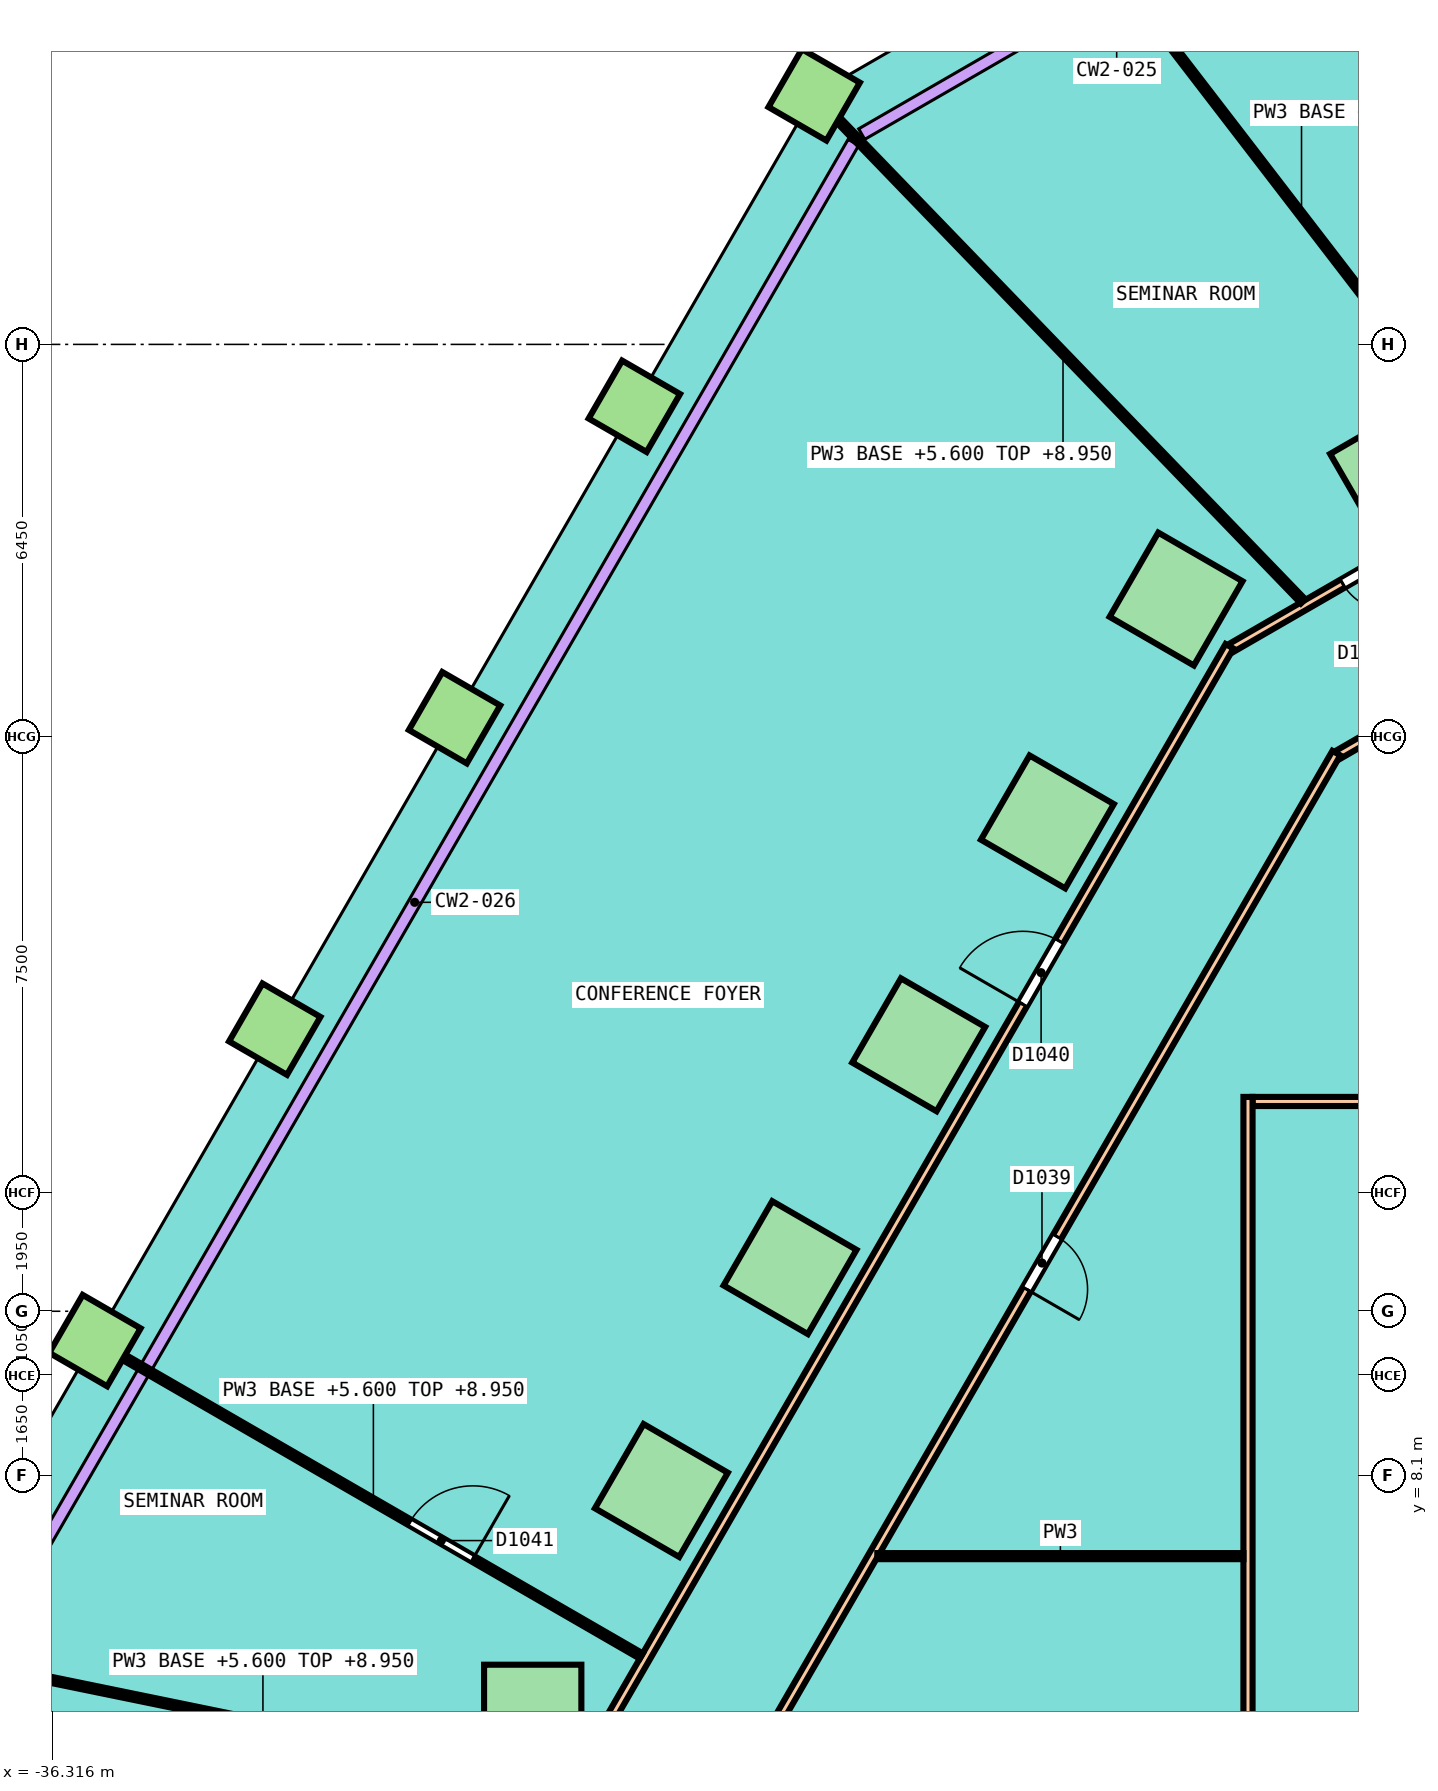
"""IFC4 building model, lengths in metres.
Left out: names, types, materials, properties, quantities, classifications, styles, units other than length and angle.
Written with IfcOpenShell. Run it as: python <this file> out.ifc"""

import sys

from ifc_helpers import new_model, si_unit, direction, frame, frame_2d, origin, origin_2d, place, context, subcontext, project, spatial, rectangle, extrude, element, fill, save


model = new_model("IFC4")
c1 = context("Model", 3, precision=1e-05, world=origin(), true_north=direction((0.0, 1.0)))
c2 = subcontext(c1, "Body", "Model", "MODEL_VIEW")
j1 = project(units=[si_unit("LENGTHUNIT", "METRE"), si_unit("PLANEANGLEUNIT", "RADIAN")], contexts=[c1])
p1 = place(None, origin())
s1 = spatial("IfcSite", under=j1, at=p1, CompositionType="ELEMENT")
p2 = place(p1, origin())
s2 = spatial("IfcBuilding", under=s1, at=p2, CompositionType="ELEMENT")
p3 = place(p2, frame((0.0, 0.0, 5.6)))
s3 = spatial("IfcBuildingStorey", under=s2, at=p3, CompositionType="ELEMENT", Elevation=5.6)
for number, where, z_axis, x_axis in (
    (1, (-14.206, 24.606, 0.0), (0.0, 0.0, 1.0), (-0.866, -0.5, 0.0)),
    (2, (-17.833, 22.512, 0.0), (0.0, 0.0, 1.0), (-0.5, -0.866, 0.0)),
    (3, (-19.949, 18.847, 0.0), (0.0, 0.0, 1.0), (-0.5, -0.866, 0.0)),
    (4, (-22.065, 15.183, 0.0), (0.0, 0.0, 1.0), (-0.5, -0.866, 0.0)),
    (5, (-24.181, 11.518, 0.0), (0.0, 0.0, 1.0), (-0.5, -0.866, 0.0)),
    (6, (-26.297, 7.853, 0.0), (0.0, 0.0, 1.0), (-0.5, -0.866, 0.0)),
    (7, (-28.413, 4.188, 0.0), (0.0, 0.0, 1.0), (0.0, -1.0, 0.0)),
):
    element("IfcColumn", number, at=place(p3, frame(where, z_axis=z_axis, x_axis=x_axis)), inside=s3, PredefinedType="COLUMN", context=c2, shape_type="SweptSolid", body=[
        extrude(rectangle(XDim=1.6, YDim=1.6, at=origin_2d()), origin(), (0.0, 0.0, 1.0), 4.25),
    ])
for number, where, z_axis, x_axis in (
    (8, (-23.785, 30.804, 0.0), (0.0, 0.0, 1.0), (-0.5, -0.866, 0.0)),
    (9, (-26.741, 25.682, 0.0), (0.0, 0.0, 1.0), (-0.5, -0.866, 0.0)),
    (10, (-29.698, 20.561, 0.0), (0.0, 0.0, 1.0), (-0.5, -0.866, 0.0)),
    (11, (-32.656, 15.439, 0.0), (0.0, 0.0, 1.0), (-0.5, -0.866, 0.0)),
    (12, (-35.612, 10.318, 0.0), (0.0, 0.0, 1.0), (-0.5, -0.866, 0.0)),
):
    element("IfcColumn", number, at=place(p3, frame(where, z_axis=z_axis, x_axis=x_axis)), inside=s3, PredefinedType="COLUMN", context=c2, shape_type="SweptSolid", body=[
        extrude(rectangle(XDim=1.1, YDim=1.1, at=origin_2d()), origin(), (0.0, 0.0, 1.0), 4.25),
    ])
p4 = place(p3, frame((-16.926, 21.708, 0.0), z_axis=(0.0, 0.0, 1.0), x_axis=(0.866023143435, 0.50000391502, 0.0)))
e13 = element("IfcWall", 13, at=p4, inside=s3, PredefinedType="PARTITIONING", context=c2, shape_type="SweptSolid", body=[
    extrude(rectangle(XDim=7.759, YDim=0.15, at=frame_2d((3.879, 0.0))), origin(), (0.0, 0.0, 1.0), 3.2),
])
p5 = place(p4, frame((2.117, 0.0, 0.0)))
e14 = element("IfcOpeningElement", 14, at=p5, cuts=e13, PredefinedType="OPENING", context=c2, shape_type="SweptSolid", body=[
    extrude(rectangle(XDim=0.9, YDim=2.1, at=frame_2d((0.45, 1.05))), frame((0.0, 0.085, 0.0), z_axis=(0.0, -1.0, 0.0), x_axis=(1.0, 0.0, 0.0)), (0.0, 0.0, 1.0), 0.17),
])
p6 = place(p3, frame((-15.169, 19.951, 0.0), z_axis=(0.0, 0.0, 1.0), x_axis=(0.866024786089, 0.500001069878, 0.0)))
e15 = element("IfcWall", 15, at=p6, inside=s3, PredefinedType="PARTITIONING", context=c2, shape_type="SweptSolid", body=[
    extrude(rectangle(XDim=6.473, YDim=0.15, at=frame_2d((3.236, 0.0))), origin(), (0.0, 0.0, 1.0), 3.2),
])
p7 = place(p3, frame((-24.825, 3.301, 0.0), z_axis=(0.0, 0.0, 1.0), x_axis=(0.499992422807, 0.866029778435, 0.0)))
e16 = element("IfcWall", 16, at=p7, inside=s3, PredefinedType="PARTITIONING", context=c2, shape_type="SweptSolid", body=[
    extrude(rectangle(XDim=19.257, YDim=0.15, at=frame_2d((9.628, 0.0))), origin(), (0.0, 0.0, 1.0), 3.2),
])
p8 = place(p7, frame((9.074, 0.0, 0.0)))
e17 = element("IfcOpeningElement", 17, at=p8, cuts=e16, PredefinedType="OPENING", context=c2, shape_type="SweptSolid", body=[
    extrude(rectangle(XDim=1.0, YDim=2.1, at=frame_2d((0.5, 1.05))), frame((0.0, 0.085, 0.0), z_axis=(0.0, -1.0, 0.0), x_axis=(1.0, 0.0, 0.0)), (0.0, 0.0, 1.0), 0.17),
])
p9 = place(p3, frame((-27.225, 3.944, 0.0), z_axis=(0.0, 0.0, 1.0), x_axis=(0.499997805905, 0.866026670542, 0.0)))
e18 = element("IfcWall", 18, at=p9, inside=s3, PredefinedType="PARTITIONING", context=c2, shape_type="SweptSolid", body=[
    extrude(rectangle(XDim=20.543, YDim=0.15, at=frame_2d((10.272, 0.0))), origin(), (0.0, 0.0, 1.0), 3.2),
])
p10 = place(p9, frame((13.746, 0.0, 0.0)))
e19 = element("IfcOpeningElement", 19, at=p10, cuts=e18, PredefinedType="OPENING", context=c2, shape_type="SweptSolid", body=[
    extrude(rectangle(XDim=1.2, YDim=2.1, at=frame_2d((0.6, 1.05))), frame((0.0, 0.085, 0.0), z_axis=(0.0, -1.0, 0.0), x_axis=(1.0, 0.0, 0.0)), (0.0, 0.0, 1.0), 0.17),
])
p11 = place(p3, frame((-16.575, 14.25, 0.0), z_axis=(0.0, 0.0, 1.0), x_axis=(1.0, 0.0, 0.0)))
e20 = element("IfcWall", 20, at=p11, inside=s3, PredefinedType="PARTITIONING", context=c2, shape_type="SweptSolid", body=[
    extrude(rectangle(XDim=7.95, YDim=0.15, at=frame_2d((3.975, 0.0))), origin(), (0.0, 0.0, 1.0), 3.2),
])
p12 = place(p3, frame((-16.65, -4.875, 0.0), z_axis=(0.0, 0.0, 1.0), x_axis=(0.0, 1.0, 0.0)))
e21 = element("IfcWall", 21, at=p12, inside=s3, PredefinedType="PARTITIONING", context=c2, shape_type="SweptSolid", body=[
    extrude(rectangle(XDim=19.2, YDim=0.15, at=frame_2d((9.6, 0.0))), origin(), (0.0, 0.0, 1.0), 3.2),
])
p13 = place(p12, frame((2.843, 0.0, 0.0)))
e22 = element("IfcOpeningElement", 22, at=p13, cuts=e21, PredefinedType="OPENING", context=c2, shape_type="SweptSolid", body=[
    extrude(rectangle(XDim=1.2, YDim=2.1, at=frame_2d((0.6, 1.05))), frame((0.0, 0.085, 0.0), z_axis=(0.0, -1.0, 0.0), x_axis=(1.0, 0.0, 0.0)), (0.0, 0.0, 1.0), 0.17),
])
p14 = place(p3, frame((-19.162, 33.242, 0.0), z_axis=(0.0, 0.0, 1.0), x_axis=(0.609546416877, -0.79275038043, 0.0)))
e23 = element("IfcWall", 23, at=p14, inside=s3, PredefinedType="PARTITIONING", context=c2, shape_type="SweptSolid", body=[
    extrude(rectangle(XDim=11.129, YDim=0.1, at=frame_2d((5.564, 0.0))), origin(), (0.0, 0.0, 1.0), 3.35),
])
p15 = place(p3, frame((-23.64, 30.654, 0.0), z_axis=(0.0, 0.0, 1.0), x_axis=(0.694530893364, -0.719462881713, 0.0)))
e24 = element("IfcWall", 24, at=p15, inside=s3, PredefinedType="PARTITIONING", context=c2, shape_type="SweptSolid", body=[
    extrude(rectangle(XDim=11.369, YDim=0.1, at=frame_2d((5.685, 0.0))), origin(), (0.0, 0.0, 1.0), 3.35),
])
p16 = place(p3, frame((-22.746, 6.773, 0.0), z_axis=(0.0, 0.0, 1.0), x_axis=(1.0, 0.0, 0.0)))
e25 = element("IfcWall", 25, at=p16, inside=s3, PredefinedType="PARTITIONING", context=c2, shape_type="SweptSolid", body=[
    extrude(rectangle(XDim=6.021, YDim=0.1, at=frame_2d((3.01, 0.0))), origin(), (0.0, 0.0, 1.0), 3.2),
])
p17 = place(p3, frame((-35.439, 10.218, 0.0), z_axis=(0.0, 0.0, 1.0), x_axis=(0.86602416344, -0.500002148333, 0.0)))
e26 = element("IfcWall", 26, at=p17, inside=s3, PredefinedType="PARTITIONING", context=c2, shape_type="SweptSolid", body=[
    extrude(rectangle(XDim=10.175, YDim=0.1, at=frame_2d((5.088, 0.0))), origin(), (0.0, 0.0, 1.0), 3.35),
])
p18 = place(p17, frame((5.778, 0.0, 0.0)))
e27 = element("IfcOpeningElement", 27, at=p18, cuts=e26, PredefinedType="OPENING", context=c2, shape_type="SweptSolid", body=[
    extrude(rectangle(XDim=1.2, YDim=2.1, at=frame_2d((0.6, 1.05))), frame((0.0, 0.06, 0.0), z_axis=(0.0, -1.0, 0.0), x_axis=(1.0, 0.0, 0.0)), (0.0, 0.0, 1.0), 0.12),
])
p19 = place(p3, frame((-38.363, 5.154, 0.0), z_axis=(0.0, 0.0, 1.0), x_axis=(0.979647999814, -0.200723183666, 0.0)))
e28 = element("IfcWall", 28, at=p19, inside=s3, PredefinedType="PARTITIONING", context=c2, shape_type="SweptSolid", body=[
    extrude(rectangle(XDim=11.256, YDim=0.1, at=frame_2d((5.628, 0.0))), origin(), (0.0, 0.0, 1.0), 3.35),
])
p20 = place(p5, origin())
e29 = element("IfcDoor", 29, at=p20, inside=s3, OperationType="SINGLE_SWING_RIGHT", PredefinedType="DOOR", context=c2, shape_type="SweptSolid", body=[
    extrude(rectangle(XDim=0.9, YDim=2.1, at=frame_2d((0.45, 1.05))), frame((0.0, 0.025, 0.0), z_axis=(0.0, -1.0, 0.0), x_axis=(1.0, 0.0, 0.0)), (0.0, 0.0, 1.0), 0.05),
])
fill(e14, e29)
p21 = place(p8, origin())
e30 = element("IfcDoor", 30, at=p21, inside=s3, OperationType="SINGLE_SWING_RIGHT", PredefinedType="DOOR", context=c2, shape_type="SweptSolid", body=[
    extrude(rectangle(XDim=1.0, YDim=2.1, at=frame_2d((0.5, 1.05))), frame((0.0, 0.025, 0.0), z_axis=(0.0, -1.0, 0.0), x_axis=(1.0, 0.0, 0.0)), (0.0, 0.0, 1.0), 0.05),
])
fill(e17, e30)
p22 = place(p10, origin())
e31 = element("IfcDoor", 31, at=p22, inside=s3, OperationType="DOUBLE_DOOR_SINGLE_SWING", PredefinedType="DOOR", context=c2, shape_type="SweptSolid", body=[
    extrude(rectangle(XDim=1.2, YDim=2.1, at=frame_2d((0.6, 1.05))), frame((0.0, 0.025, 0.0), z_axis=(0.0, -1.0, 0.0), x_axis=(1.0, 0.0, 0.0)), (0.0, 0.0, 1.0), 0.05),
])
fill(e19, e31)
p23 = place(p18, origin())
e32 = element("IfcDoor", 32, at=p23, inside=s3, OperationType="DOUBLE_DOOR_SINGLE_SWING", PredefinedType="DOOR", context=c2, shape_type="SweptSolid", body=[
    extrude(rectangle(XDim=1.2, YDim=2.1, at=frame_2d((0.6, 1.05))), frame((0.0, 0.025, 0.0), z_axis=(0.0, -1.0, 0.0), x_axis=(1.0, 0.0, 0.0)), (0.0, 0.0, 1.0), 0.05),
])
fill(e27, e32)
save(model, sys.argv[1])
